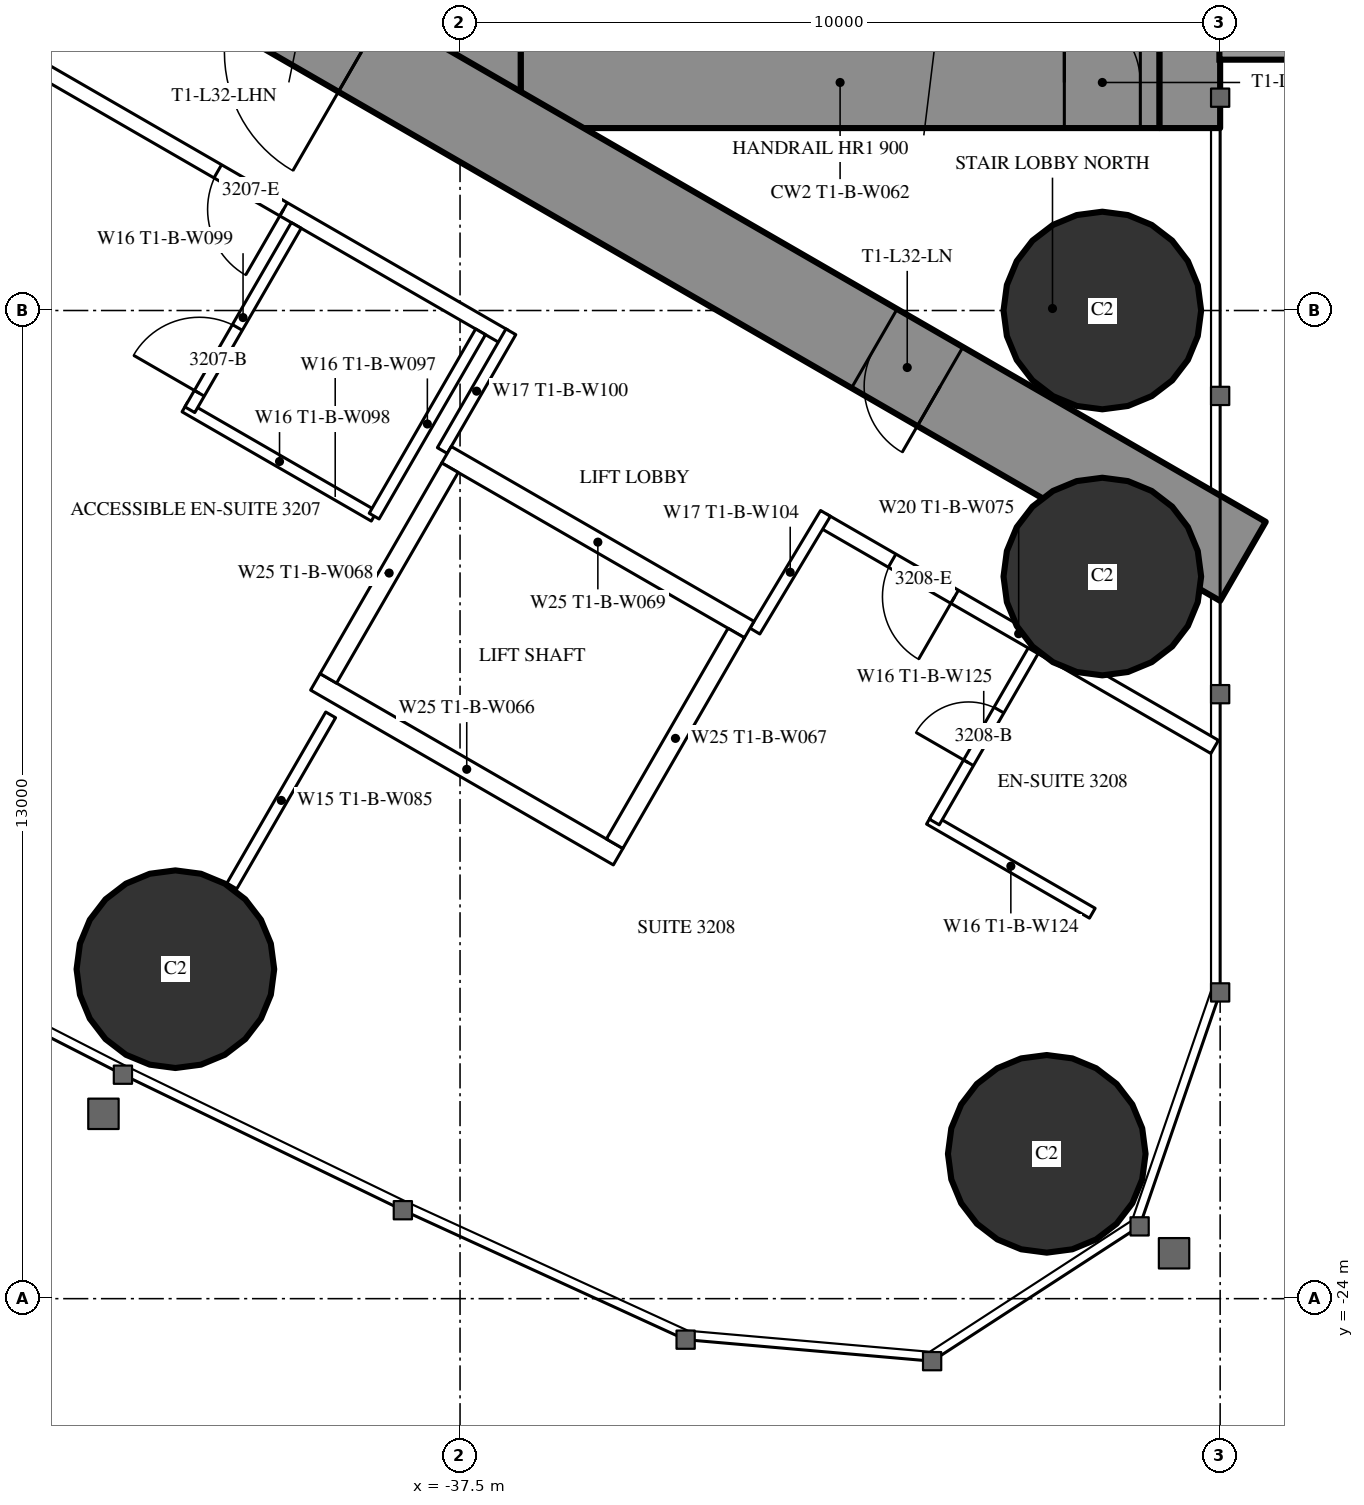
"""IFC4 building model, lengths in metres.
Left out: names, types, materials, properties, quantities, classifications, styles, units other than length and angle.
Written with IfcOpenShell. Run it as: python <this file> out.ifc"""

import sys

from ifc_helpers import new_model, si_unit, direction, frame, frame_2d, origin, origin_2d, place, context, subcontext, project, spatial, rectangle, hollow_circle, extrude, element, fill, save


model = new_model("IFC4")
c1 = context("Model", 3, precision=1e-05, world=origin(), true_north=direction((0.0, 1.0)))
c2 = subcontext(c1, "Body", "Model", "MODEL_VIEW")
j1 = project(units=[si_unit("LENGTHUNIT", "METRE"), si_unit("PLANEANGLEUNIT", "RADIAN")], contexts=[c1])
p1 = place(None, origin())
s1 = spatial("IfcSite", under=j1, at=p1, CompositionType="ELEMENT")
p2 = place(p1, origin())
s2 = spatial("IfcBuilding", under=s1, at=p2, CompositionType="ELEMENT")
p3 = place(p2, frame((0.0, 0.0, 122.1)))
s3 = spatial("IfcBuildingStorey", under=s2, at=p3, CompositionType="ELEMENT", Elevation=122.1)
for number, where, z_axis, x_axis in (
    (1, (-29.781, -22.095, 0.0), (0.0, 0.0, 1.0), (1.0, 0.0, 0.0)),
    (2, (-29.05, -11.0, 0.0), (0.0, 0.0, 1.0), (1.0, 0.0, 0.0)),
    (3, (-29.05, -14.5, 0.0), (0.0, 0.0, 1.0), (1.0, 0.0, 0.0)),
    (4, (-41.245, -19.666, 0.0), (0.0, 0.0, 1.0), (1.0, 0.0, 0.0)),
):
    element("IfcColumn", number, at=place(p3, frame(where, z_axis=z_axis, x_axis=x_axis)), inside=s3, PredefinedType="COLUMN", context=c2, shape_type="SweptSolid", body=[
        extrude(hollow_circle(Radius=1.3, WallThickness=0.1, at=origin_2d()), origin(), (0.0, 0.0, 1.0), 3.5),
    ])
p4 = place(p3, frame((-27.9, 8.6, 0.0), z_axis=(0.0, 0.0, 1.0), x_axis=(0.0, -1.0, 0.0)))
e5 = element("IfcWall", 5, at=p4, inside=s3, PredefinedType="SHEAR", context=c2, shape_type="SweptSolid", body=[
    extrude(rectangle(XDim=17.2, YDim=0.8, at=frame_2d((8.6, 0.0))), origin(), (0.0, 0.0, 1.0), 3.5),
])
p5 = place(p4, frame((2.45, 0.0, 0.6)))
e6 = element("IfcOpeningElement", 6, at=p5, cuts=e5, PredefinedType="OPENING", context=c2, shape_type="SweptSolid", body=[
    extrude(rectangle(XDim=0.6, YDim=2.1, at=frame_2d((0.3, 1.05))), frame((0.0, 0.41, 0.0), z_axis=(0.0, -1.0, 0.0), x_axis=(1.0, 0.0, 0.0)), (0.0, 0.0, 1.0), 0.82),
])
p6 = place(p4, frame((14.15, 0.0, 0.6)))
e7 = element("IfcOpeningElement", 7, at=p6, cuts=e5, PredefinedType="OPENING", context=c2, shape_type="SweptSolid", body=[
    extrude(rectangle(XDim=0.6, YDim=2.1, at=frame_2d((0.3, 1.05))), frame((0.0, 0.41, 0.0), z_axis=(0.0, -1.0, 0.0), x_axis=(1.0, 0.0, 0.0)), (0.0, 0.0, 1.0), 0.82),
])
p7 = place(p3, frame((-37.3, 8.6, 0.0), z_axis=(0.0, 0.0, 1.0), x_axis=(0.0, -1.0, 0.0)))
e8 = element("IfcWall", 8, at=p7, inside=s3, PredefinedType="SHEAR", context=c2, shape_type="SweptSolid", body=[
    extrude(rectangle(XDim=17.2, YDim=1.2, at=frame_2d((8.6, 0.0))), origin(), (0.0, 0.0, 1.0), 3.5),
])
p8 = place(p7, frame((7.7, 0.0, 0.0)))
e9 = element("IfcOpeningElement", 9, at=p8, cuts=e8, PredefinedType="OPENING", context=c2, shape_type="SweptSolid", body=[
    extrude(rectangle(XDim=1.8, YDim=2.2, at=frame_2d((0.9, 1.1))), frame((0.0, 0.61, 0.0), z_axis=(0.0, -1.0, 0.0), x_axis=(1.0, 0.0, 0.0)), (0.0, 0.0, 1.0), 1.22),
])
p9 = place(p3, frame((-28.3, -8.0, 0.0), z_axis=(0.0, 0.0, 1.0), x_axis=(-1.0, 0.0, 0.0)))
e10 = element("IfcWall", 10, at=p9, inside=s3, PredefinedType="SHEAR", context=c2, shape_type="SweptSolid", body=[
    extrude(rectangle(XDim=8.4, YDim=1.2, at=frame_2d((4.2, 0.0))), origin(), (0.0, 0.0, 1.0), 3.5),
])
p10 = place(p9, frame((0.25, 0.0, 0.0)))
e11 = element("IfcOpeningElement", 11, at=p10, cuts=e10, PredefinedType="OPENING", context=c2, shape_type="SweptSolid", body=[
    extrude(rectangle(XDim=1.0, YDim=2.2, at=frame_2d((0.5, 1.1))), frame((0.0, 0.61, 0.0), z_axis=(0.0, -1.0, 0.0), x_axis=(1.0, 0.0, 0.0)), (0.0, 0.0, 1.0), 1.22),
])
p11 = place(p3, frame((-27.2, -14.3, 0.0), z_axis=(0.0, 0.0, 1.0), x_axis=(-0.866024021859, 0.500002393557, 0.0)))
e12 = element("IfcWall", 12, at=p11, inside=s3, PredefinedType="SHEAR", context=c2, shape_type="SweptSolid", body=[
    extrude(rectangle(XDim=27.907, YDim=1.2, at=frame_2d((13.954, 0.0))), origin(), (0.0, 0.0, 1.0), 3.5),
])
p12 = place(p11, frame((4.6, 0.0, 0.0)))
e13 = element("IfcOpeningElement", 13, at=p12, cuts=e12, PredefinedType="OPENING", context=c2, shape_type="SweptSolid", body=[
    extrude(rectangle(XDim=1.0, YDim=2.2, at=frame_2d((0.5, 1.1))), frame((0.0, 0.61, 0.0), z_axis=(0.0, -1.0, 0.0), x_axis=(1.0, 0.0, 0.0)), (0.0, 0.0, 1.0), 1.22),
])
p13 = place(p11, frame((13.395, 0.0, 0.0)))
e14 = element("IfcOpeningElement", 14, at=p13, cuts=e12, PredefinedType="OPENING", context=c2, shape_type="SweptSolid", body=[
    extrude(rectangle(XDim=1.8, YDim=2.2, at=frame_2d((0.9, 1.1))), frame((0.0, 0.61, 0.0), z_axis=(0.0, -1.0, 0.0), x_axis=(1.0, 0.0, 0.0)), (0.0, 0.0, 1.0), 1.22),
])
p14 = place(p3, frame((-39.202, -16.32, 0.0), z_axis=(0.0, 0.0, 1.0), x_axis=(-0.49997716683, -0.86603858612, 0.0)))
e15 = element("IfcWall", 15, at=p14, inside=s3, PredefinedType="PARTITIONING", context=c2, shape_type="SweptSolid", body=[
    extrude(rectangle(XDim=2.6, YDim=0.15, at=frame_2d((1.3, 0.0))), origin(), (0.0, 0.0, 1.0), 3.25),
])
p15 = place(p3, frame((-27.572, -16.741, 0.0), z_axis=(0.0, 0.0, 1.0), x_axis=(-0.866024464444, 0.500001626982, 0.0)))
e16 = element("IfcWall", 16, at=p15, inside=s3, PredefinedType="PARTITIONING", context=c2, shape_type="SweptSolid", body=[
    extrude(rectangle(XDim=5.955, YDim=0.2, at=frame_2d((2.978, 0.0))), origin(), (0.0, 0.0, 1.0), 3.25),
])
p16 = place(p15, frame((3.95, 0.0, 0.0)))
e17 = element("IfcOpeningElement", 17, at=p16, cuts=e16, PredefinedType="OPENING", context=c2, shape_type="SweptSolid", body=[
    extrude(rectangle(XDim=0.95, YDim=2.2, at=frame_2d((0.475, 1.1))), frame((0.0, 0.11, 0.0), z_axis=(0.0, -1.0, 0.0), x_axis=(1.0, 0.0, 0.0)), (0.0, 0.0, 1.0), 0.22),
])
p17 = place(p3, frame((-36.92, -11.344, 0.0), z_axis=(0.0, 0.0, 1.0), x_axis=(-0.866028313256, 0.499994960614, 0.0)))
e18 = element("IfcWall", 18, at=p17, inside=s3, PredefinedType="PARTITIONING", context=c2, shape_type="SweptSolid", body=[
    extrude(rectangle(XDim=22.568, YDim=0.2, at=frame_2d((11.284, 0.0))), origin(), (0.0, 0.0, 1.0), 3.25),
])
p18 = place(p17, frame((12.131, 0.0, 0.0)))
e19 = element("IfcOpeningElement", 19, at=p18, cuts=e18, PredefinedType="OPENING", context=c2, shape_type="SweptSolid", body=[
    extrude(rectangle(XDim=0.95, YDim=2.2, at=frame_2d((0.475, 1.1))), frame((0.0, 0.11, 0.0), z_axis=(0.0, -1.0, 0.0), x_axis=(1.0, 0.0, 0.0)), (0.0, 0.0, 1.0), 0.22),
])
p19 = place(p17, frame((3.35, 0.0, 0.0)))
e20 = element("IfcOpeningElement", 20, at=p19, cuts=e18, PredefinedType="OPENING", context=c2, shape_type="SweptSolid", body=[
    extrude(rectangle(XDim=1.0, YDim=2.2, at=frame_2d((0.5, 1.1))), frame((0.0, 0.11, 0.0), z_axis=(0.0, -1.0, 0.0), x_axis=(1.0, 0.0, 0.0)), (0.0, 0.0, 1.0), 0.22),
])
p20 = place(p3, frame((-36.831, -11.28, 0.0), z_axis=(0.0, 0.0, 1.0), x_axis=(-0.499937177781, -0.866061671171, 0.0)))
e21 = element("IfcWall", 21, at=p20, inside=s3, PredefinedType="PARTITIONING", context=c2, shape_type="SweptSolid", body=[
    extrude(rectangle(XDim=1.804, YDim=0.15, at=frame_2d((0.902, 0.0))), origin(), (0.0, 0.0, 1.0), 3.25),
])
p21 = place(p3, frame((-33.621, -15.218, 0.0), z_axis=(0.0, 0.0, 1.0), x_axis=(0.514336634837, 0.857588377991, 0.0)))
e22 = element("IfcWall", 22, at=p21, inside=s3, PredefinedType="PARTITIONING", context=c2, shape_type="SweptSolid", body=[
    extrude(rectangle(XDim=1.805, YDim=0.15, at=frame_2d((0.903, 0.0))), origin(), (0.0, 0.0, 1.0), 3.25),
])
p22 = place(p3, frame((-38.63, -13.705, 0.0), z_axis=(0.0, 0.0, 1.0), x_axis=(-0.866018712932, 0.500011588718, 0.0)))
e23 = element("IfcWall", 23, at=p22, inside=s3, PredefinedType="PARTITIONING", context=c2, shape_type="SweptSolid", body=[
    extrude(rectangle(XDim=2.875, YDim=0.15, at=frame_2d((1.438, 0.0))), origin(), (0.0, 0.0, 1.0), 3.25),
])
p23 = place(p3, frame((-39.655, -9.88, 0.0), z_axis=(0.0, 0.0, 1.0), x_axis=(-0.500049511043, -0.865996816683, 0.0)))
e24 = element("IfcWall", 24, at=p23, inside=s3, PredefinedType="PARTITIONING", context=c2, shape_type="SweptSolid", body=[
    extrude(rectangle(XDim=2.8, YDim=0.15, at=frame_2d((1.4, 0.0))), origin(), (0.0, 0.0, 1.0), 3.25),
])
p24 = place(p23, frame((1.55, 0.0, 0.0)))
e25 = element("IfcOpeningElement", 25, at=p24, cuts=e24, PredefinedType="OPENING", context=c2, shape_type="SweptSolid", body=[
    extrude(rectangle(XDim=1.0, YDim=2.2, at=frame_2d((0.5, 1.1))), frame((0.0, 0.085, 0.0), z_axis=(0.0, -1.0, 0.0), x_axis=(1.0, 0.0, 0.0)), (0.0, 0.0, 1.0), 0.17),
])
p25 = place(p3, frame((-37.23, -11.281, 0.0), z_axis=(0.0, 0.0, 1.0), x_axis=(-0.500049511043, -0.865996816683, 0.0)))
e26 = element("IfcWall", 26, at=p25, inside=s3, PredefinedType="PARTITIONING", context=c2, shape_type="SweptSolid", body=[
    extrude(rectangle(XDim=2.8, YDim=0.15, at=frame_2d((1.4, 0.0))), origin(), (0.0, 0.0, 1.0), 3.25),
])
p26 = place(p3, frame((-29.182, -18.929, 0.0), z_axis=(0.0, 0.0, 1.0), x_axis=(-0.866006523861, 0.500032699561, 0.0)))
e27 = element("IfcWall", 27, at=p26, inside=s3, PredefinedType="PARTITIONING", context=c2, shape_type="SweptSolid", body=[
    extrude(rectangle(XDim=2.475, YDim=0.15, at=frame_2d((1.237, 0.0))), origin(), (0.0, 0.0, 1.0), 3.25),
])
p27 = place(p3, frame((-29.96, -15.478, 0.0), z_axis=(0.0, 0.0, 1.0), x_axis=(-0.500006934395, -0.866021400173, 0.0)))
e28 = element("IfcWall", 28, at=p27, inside=s3, PredefinedType="PARTITIONING", context=c2, shape_type="SweptSolid", body=[
    extrude(rectangle(XDim=2.6, YDim=0.15, at=frame_2d((1.3, 0.0))), origin(), (0.0, 0.0, 1.0), 3.25),
])
p28 = place(p27, frame((0.9, 0.0, 0.0)))
e29 = element("IfcOpeningElement", 29, at=p28, cuts=e28, PredefinedType="OPENING", context=c2, shape_type="SweptSolid", body=[
    extrude(rectangle(XDim=0.8, YDim=2.2, at=frame_2d((0.4, 1.1))), frame((0.0, 0.085, 0.0), z_axis=(0.0, -1.0, 0.0), x_axis=(1.0, 0.0, 0.0)), (0.0, 0.0, 1.0), 0.17),
])
p29 = place(p3, frame((-33.696, -15.197, 0.0), z_axis=(0.0, 0.0, 1.0), x_axis=(-0.865976953817, 0.500083908417, 0.0)))
e30 = element("IfcWall", 30, at=p29, inside=s3, PredefinedType="PARTITIONING", context=c2, shape_type="SweptSolid", body=[
    extrude(rectangle(XDim=4.599, YDim=0.25, at=frame_2d((2.3, 0.0))), origin(), (0.0, 0.0, 1.0), 3.25),
])
p30 = place(p3, frame((-35.42, -18.186, 0.0), z_axis=(0.0, 0.0, 1.0), x_axis=(-0.865990227814, 0.50006092162, 0.0)))
e31 = element("IfcWall", 31, at=p30, inside=s3, PredefinedType="PARTITIONING", context=c2, shape_type="SweptSolid", body=[
    extrude(rectangle(XDim=4.6, YDim=0.25, at=frame_2d((2.3, 0.0))), origin(), (0.0, 0.0, 1.0), 3.25),
])
p31 = place(p3, frame((-33.866, -15.243, 0.0), z_axis=(0.0, 0.0, 1.0), x_axis=(-0.499929347863, -0.866066190972, 0.0)))
e32 = element("IfcWall", 32, at=p31, inside=s3, PredefinedType="PARTITIONING", context=c2, shape_type="SweptSolid", body=[
    extrude(rectangle(XDim=3.201, YDim=0.25, at=frame_2d((1.6, 0.0))), origin(), (0.0, 0.0, 1.0), 3.25),
])
p32 = place(p3, frame((-37.633, -13.068, 0.0), z_axis=(0.0, 0.0, 1.0), x_axis=(-0.499872130319, -0.866099216793, 0.0)))
e33 = element("IfcWall", 33, at=p32, inside=s3, PredefinedType="PARTITIONING", context=c2, shape_type="SweptSolid", body=[
    extrude(rectangle(XDim=3.2, YDim=0.25, at=frame_2d((1.6, 0.0))), origin(), (0.0, 0.0, 1.0), 3.25),
])
p33 = place(p24, origin())
e34 = element("IfcDoor", 34, at=p33, inside=s3, OperationType="SINGLE_SWING_RIGHT", PredefinedType="DOOR", context=c2, shape_type="SweptSolid", body=[
    extrude(rectangle(XDim=1.0, YDim=2.2, at=frame_2d((0.5, 1.1))), frame((0.0, 0.025, 0.0), z_axis=(0.0, -1.0, 0.0), x_axis=(1.0, 0.0, 0.0)), (0.0, 0.0, 1.0), 0.05),
])
fill(e25, e34)
p34 = place(p19, origin())
e35 = element("IfcDoor", 35, at=p34, inside=s3, OperationType="SINGLE_SWING_LEFT", PredefinedType="DOOR", context=c2, shape_type="SweptSolid", body=[
    extrude(rectangle(XDim=1.0, YDim=2.2, at=frame_2d((0.5, 1.1))), frame((0.0, 0.025, 0.0), z_axis=(0.0, -1.0, 0.0), x_axis=(1.0, 0.0, 0.0)), (0.0, 0.0, 1.0), 0.05),
])
fill(e20, e35)
p35 = place(p28, origin())
e36 = element("IfcDoor", 36, at=p35, inside=s3, OperationType="SINGLE_SWING_RIGHT", PredefinedType="DOOR", context=c2, shape_type="SweptSolid", body=[
    extrude(rectangle(XDim=0.8, YDim=2.2, at=frame_2d((0.4, 1.1))), frame((0.0, 0.025, 0.0), z_axis=(0.0, -1.0, 0.0), x_axis=(1.0, 0.0, 0.0)), (0.0, 0.0, 1.0), 0.05),
])
fill(e29, e36)
p36 = place(p16, origin())
e37 = element("IfcDoor", 37, at=p36, inside=s3, OperationType="SINGLE_SWING_LEFT", PredefinedType="DOOR", context=c2, shape_type="SweptSolid", body=[
    extrude(rectangle(XDim=0.95, YDim=2.2, at=frame_2d((0.475, 1.1))), frame((0.0, 0.025, 0.0), z_axis=(0.0, -1.0, 0.0), x_axis=(1.0, 0.0, 0.0)), (0.0, 0.0, 1.0), 0.05),
])
fill(e17, e37)
p37 = place(p12, origin())
e38 = element("IfcDoor", 38, at=p37, inside=s3, OperationType="SINGLE_SWING_LEFT", PredefinedType="DOOR", context=c2, shape_type="SweptSolid", body=[
    extrude(rectangle(XDim=1.0, YDim=2.2, at=frame_2d((0.5, 1.1))), frame((0.0, 0.025, 0.0), z_axis=(0.0, -1.0, 0.0), x_axis=(1.0, 0.0, 0.0)), (0.0, 0.0, 1.0), 0.05),
])
fill(e13, e38)
p38 = place(p13, origin())
e39 = element("IfcDoor", 39, at=p38, inside=s3, OperationType="DOUBLE_DOOR_SINGLE_SWING", PredefinedType="DOOR", context=c2, shape_type="SweptSolid", body=[
    extrude(rectangle(XDim=1.8, YDim=2.2, at=frame_2d((0.9, 1.1))), frame((0.0, 0.025, 0.0), z_axis=(0.0, -1.0, 0.0), x_axis=(1.0, 0.0, 0.0)), (0.0, 0.0, 1.0), 0.05),
])
fill(e14, e39)
p39 = place(p10, origin())
e40 = element("IfcDoor", 40, at=p39, inside=s3, OperationType="SINGLE_SWING_RIGHT", PredefinedType="DOOR", context=c2, shape_type="SweptSolid", body=[
    extrude(rectangle(XDim=1.0, YDim=2.2, at=frame_2d((0.5, 1.1))), frame((0.0, 0.025, 0.0), z_axis=(0.0, -1.0, 0.0), x_axis=(1.0, 0.0, 0.0)), (0.0, 0.0, 1.0), 0.05),
])
fill(e11, e40)
save(model, sys.argv[1])
